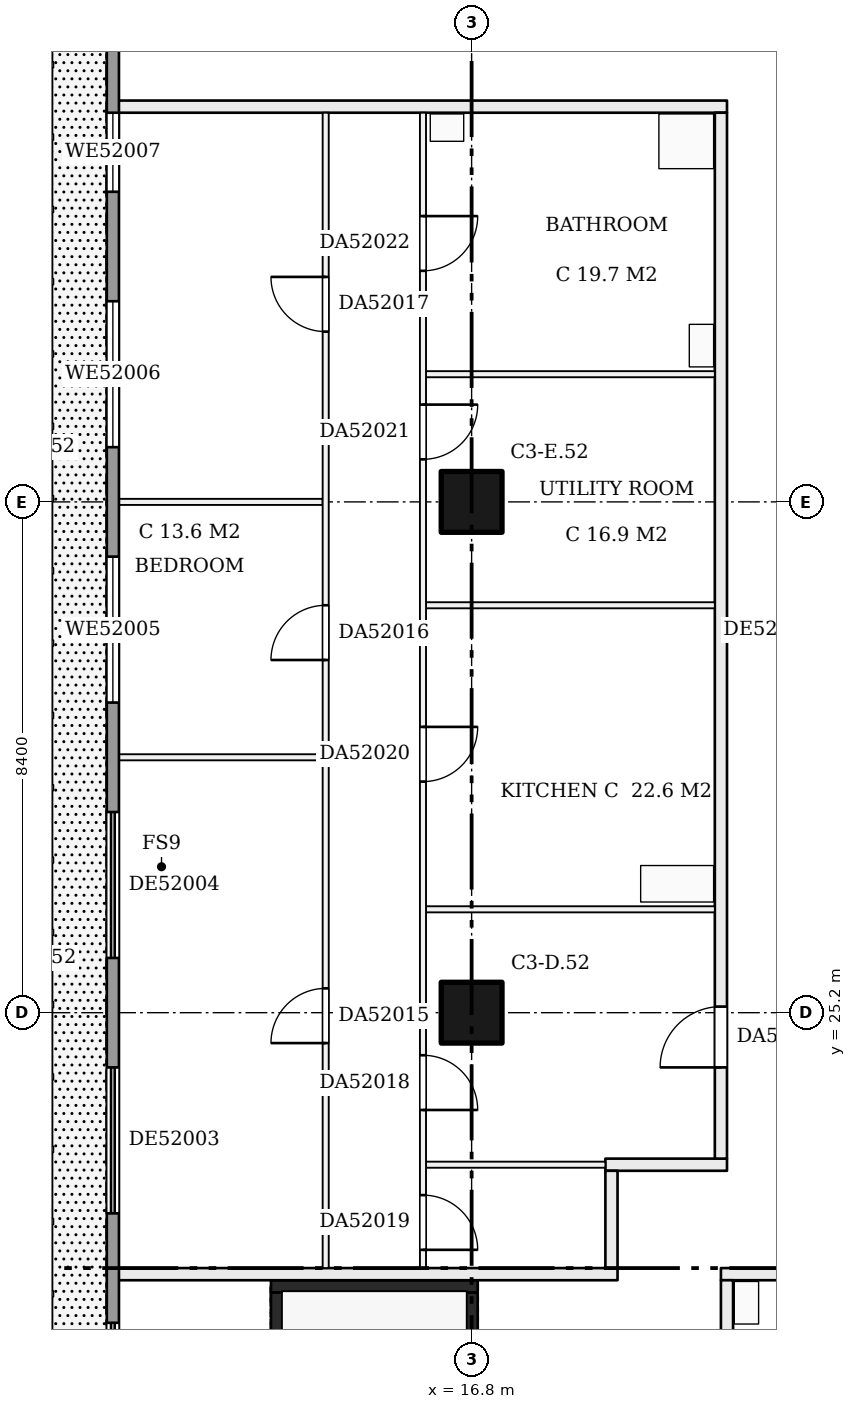
"""IFC4 building model, lengths in metres.
Left out: names, types, materials, properties, quantities, classifications, styles, units other than length and angle.
Written with IfcOpenShell. Run it as: python <this file> out.ifc"""

import sys

from ifc_helpers import new_model, si_unit, direction, frame, frame_2d, origin, origin_2d, place, context, subcontext, project, spatial, rectangle, extrude, element, fill, save


model = new_model("IFC4")
c1 = context("Model", 3, precision=1e-05, world=origin(), true_north=direction((0.0, 1.0)))
c2 = subcontext(c1, "Body", "Model", "MODEL_VIEW")
j1 = project(units=[si_unit("LENGTHUNIT", "METRE"), si_unit("PLANEANGLEUNIT", "RADIAN")], contexts=[c1])
p1 = place(None, origin())
s1 = spatial("IfcSite", under=j1, at=p1, CompositionType="ELEMENT")
p2 = place(p1, origin())
s2 = spatial("IfcBuilding", under=s1, at=p2, CompositionType="ELEMENT")
p3 = place(p2, frame((0.0, 0.0, 200.2)))
s3 = spatial("IfcBuildingStorey", under=s2, at=p3, CompositionType="ELEMENT", Elevation=200.2)
for number, where, z_axis, x_axis in (
    (1, (16.8, 25.2, 0.0), (0.0, 0.0, 1.0), (1.0, 0.0, 0.0)),
    (2, (16.8, 33.6, 0.0), (0.0, 0.0, 1.0), (1.0, 0.0, 0.0)),
):
    element("IfcColumn", number, at=place(p3, frame(where, z_axis=z_axis, x_axis=x_axis)), inside=s3, PredefinedType="COLUMN", context=c2, shape_type="SweptSolid", body=[
        extrude(rectangle(XDim=1.0, YDim=1.0, at=origin_2d()), origin(), (0.0, 0.0, 1.0), 3.22),
    ])
p4 = place(p3, frame((13.6, 13.8, 0.0), z_axis=(0.0, 0.0, 1.0), x_axis=(0.0, 1.0, 0.0)))
e3 = element("IfcWall", 3, at=p4, inside=s3, PredefinedType="SHEAR", context=c2, shape_type="SweptSolid", body=[
    extrude(rectangle(XDim=6.8, YDim=0.2, at=frame_2d((3.4, 0.0))), origin(), (0.0, 0.0, 1.0), 3.22),
])
p5 = place(p3, frame((16.8, 13.8, 0.0), z_axis=(0.0, 0.0, 1.0), x_axis=(0.0, 1.0, 0.0)))
e4 = element("IfcWall", 4, at=p5, inside=s3, PredefinedType="SHEAR", context=c2, shape_type="SweptSolid", body=[
    extrude(rectangle(XDim=6.8, YDim=0.2, at=frame_2d((3.4, 0.0))), origin(), (0.0, 0.0, 1.0), 3.22),
])
p6 = place(p5, frame((0.1, 0.0, 0.0)))
e5 = element("IfcOpeningElement", 5, at=p6, cuts=e4, PredefinedType="OPENING", context=c2, shape_type="SweptSolid", body=[
    extrude(rectangle(XDim=1.0, YDim=2.1, at=frame_2d((0.5, 1.05))), frame((0.0, 0.11, 0.0), z_axis=(0.0, -1.0, 0.0), x_axis=(1.0, 0.0, 0.0)), (0.0, 0.0, 1.0), 0.22),
])
p7 = place(p3, frame((13.5, 20.7, 0.0), z_axis=(0.0, 0.0, 1.0), x_axis=(1.0, 0.0, 0.0)))
e6 = element("IfcWall", 6, at=p7, inside=s3, PredefinedType="SHEAR", context=c2, shape_type="SweptSolid", body=[
    extrude(rectangle(XDim=3.4, YDim=0.2, at=frame_2d((1.7, 0.0))), origin(), (0.0, 0.0, 1.0), 3.22),
])
p8 = place(p3, frame((10.9, 20.9, 0.0), z_axis=(0.0, 0.0, 1.0), x_axis=(1.0, 0.0, 0.0)))
e7 = element("IfcWall", 7, at=p8, inside=s3, PredefinedType="PARTITIONING", context=c2, shape_type="SweptSolid", body=[
    extrude(rectangle(XDim=8.3, YDim=0.2, at=frame_2d((4.15, 0.0))), origin(), (0.0, 0.0, 1.0), 3.22),
])
p9 = place(p3, frame((20.9, 20.9, 0.0), z_axis=(0.0, 0.0, 1.0), x_axis=(1.0, 0.0, 0.0)))
e8 = element("IfcWall", 8, at=p9, inside=s3, PredefinedType="PARTITIONING", context=c2, shape_type="SweptSolid", body=[
    extrude(rectangle(XDim=19.3, YDim=0.2, at=frame_2d((9.65, 0.0))), origin(), (0.0, 0.0, 1.0), 3.22),
])
p10 = place(p9, frame((5.374, 0.0, 0.0)))
e9 = element("IfcOpeningElement", 9, at=p10, cuts=e8, PredefinedType="OPENING", context=c2, shape_type="SweptSolid", body=[
    extrude(rectangle(XDim=1.0, YDim=2.1, at=frame_2d((0.5, 1.05))), frame((0.0, 0.11, 0.0), z_axis=(0.0, -1.0, 0.0), x_axis=(1.0, 0.0, 0.0)), (0.0, 0.0, 1.0), 0.22),
])
p11 = place(p9, frame((13.633, 0.0, 0.0)))
e10 = element("IfcOpeningElement", 10, at=p11, cuts=e8, PredefinedType="OPENING", context=c2, shape_type="SweptSolid", body=[
    extrude(rectangle(XDim=1.0, YDim=2.1, at=frame_2d((0.5, 1.05))), frame((0.0, 0.11, 0.0), z_axis=(0.0, -1.0, 0.0), x_axis=(1.0, 0.0, 0.0)), (0.0, 0.0, 1.0), 0.22),
])
p12 = place(p3, frame((16.05, 22.7, 0.0), z_axis=(0.0, 0.0, 1.0), x_axis=(1.0, 0.0, 0.0)))
e11 = element("IfcWall", 11, at=p12, inside=s3, PredefinedType="PARTITIONING", context=c2, shape_type="SweptSolid", body=[
    extrude(rectangle(XDim=2.95, YDim=0.1, at=frame_2d((1.475, 0.0))), origin(), (0.0, 0.0, 1.0), 3.22),
])
p13 = place(p3, frame((19.0, 22.7, 0.0), z_axis=(0.0, 0.0, 1.0), x_axis=(1.0, 0.0, 0.0)))
e12 = element("IfcWall", 12, at=p13, inside=s3, PredefinedType="PARTITIONING", context=c2, shape_type="SweptSolid", body=[
    extrude(rectangle(XDim=2.0, YDim=0.2, at=frame_2d((1.0, 0.0))), origin(), (0.0, 0.0, 1.0), 3.22),
])
p14 = place(p3, frame((16.05, 26.9, 0.0), z_axis=(0.0, 0.0, 1.0), x_axis=(1.0, 0.0, 0.0)))
e13 = element("IfcWall", 13, at=p14, inside=s3, PredefinedType="PARTITIONING", context=c2, shape_type="SweptSolid", body=[
    extrude(rectangle(XDim=4.75, YDim=0.1, at=frame_2d((2.375, 0.0))), origin(), (0.0, 0.0, 1.0), 3.22),
])
p15 = place(p3, frame((10.9, 29.4, 0.0), z_axis=(0.0, 0.0, 1.0), x_axis=(1.0, 0.0, 0.0)))
e14 = element("IfcWall", 14, at=p15, inside=s3, PredefinedType="PARTITIONING", context=c2, shape_type="SweptSolid", body=[
    extrude(rectangle(XDim=3.45, YDim=0.1, at=frame_2d((1.725, 0.0))), origin(), (0.0, 0.0, 1.0), 3.22),
])
p16 = place(p3, frame((16.05, 31.9, 0.0), z_axis=(0.0, 0.0, 1.0), x_axis=(1.0, 0.0, 0.0)))
e15 = element("IfcWall", 15, at=p16, inside=s3, PredefinedType="PARTITIONING", context=c2, shape_type="SweptSolid", body=[
    extrude(rectangle(XDim=4.75, YDim=0.1, at=frame_2d((2.375, 0.0))), origin(), (0.0, 0.0, 1.0), 3.22),
])
p17 = place(p3, frame((10.9, 33.6, 0.0), z_axis=(0.0, 0.0, 1.0), x_axis=(1.0, 0.0, 0.0)))
e16 = element("IfcWall", 16, at=p17, inside=s3, PredefinedType="PARTITIONING", context=c2, shape_type="SweptSolid", body=[
    extrude(rectangle(XDim=3.45, YDim=0.1, at=frame_2d((1.725, 0.0))), origin(), (0.0, 0.0, 1.0), 3.22),
])
p18 = place(p3, frame((16.05, 35.7, 0.0), z_axis=(0.0, 0.0, 1.0), x_axis=(1.0, 0.0, 0.0)))
e17 = element("IfcWall", 17, at=p18, inside=s3, PredefinedType="PARTITIONING", context=c2, shape_type="SweptSolid", body=[
    extrude(rectangle(XDim=4.75, YDim=0.1, at=frame_2d((2.375, 0.0))), origin(), (0.0, 0.0, 1.0), 3.22),
])
p19 = place(p3, frame((10.9, 40.1, 0.0), z_axis=(0.0, 0.0, 1.0), x_axis=(1.0, 0.0, 0.0)))
e18 = element("IfcWall", 18, at=p19, inside=s3, PredefinedType="PARTITIONING", context=c2, shape_type="SweptSolid", body=[
    extrude(rectangle(XDim=10.1, YDim=0.2, at=frame_2d((5.05, 0.0))), origin(), (0.0, 0.0, 1.0), 3.22),
])
p20 = place(p3, frame((14.4, 21.0, 0.0), z_axis=(0.0, 0.0, 1.0), x_axis=(0.0, 1.0, 0.0)))
e19 = element("IfcWall", 19, at=p20, inside=s3, PredefinedType="PARTITIONING", context=c2, shape_type="SweptSolid", body=[
    extrude(rectangle(XDim=19.0, YDim=0.1, at=frame_2d((9.5, 0.0))), origin(), (0.0, 0.0, 1.0), 3.22),
])
p21 = place(p20, frame((3.7, 0.0, 0.0)))
e20 = element("IfcOpeningElement", 20, at=p21, cuts=e19, PredefinedType="OPENING", context=c2, shape_type="SweptSolid", body=[
    extrude(rectangle(XDim=0.9, YDim=2.1, at=frame_2d((0.45, 1.05))), frame((0.0, 0.06, 0.0), z_axis=(0.0, -1.0, 0.0), x_axis=(1.0, 0.0, 0.0)), (0.0, 0.0, 1.0), 0.12),
])
p22 = place(p20, frame((10.0, 0.0, 0.0)))
e21 = element("IfcOpeningElement", 21, at=p22, cuts=e19, PredefinedType="OPENING", context=c2, shape_type="SweptSolid", body=[
    extrude(rectangle(XDim=0.9, YDim=2.1, at=frame_2d((0.45, 1.05))), frame((0.0, 0.06, 0.0), z_axis=(0.0, -1.0, 0.0), x_axis=(1.0, 0.0, 0.0)), (0.0, 0.0, 1.0), 0.12),
])
p23 = place(p20, frame((15.4, 0.0, 0.0)))
e22 = element("IfcOpeningElement", 22, at=p23, cuts=e19, PredefinedType="OPENING", context=c2, shape_type="SweptSolid", body=[
    extrude(rectangle(XDim=0.9, YDim=2.1, at=frame_2d((0.45, 1.05))), frame((0.0, 0.06, 0.0), z_axis=(0.0, -1.0, 0.0), x_axis=(1.0, 0.0, 0.0)), (0.0, 0.0, 1.0), 0.12),
])
p24 = place(p3, frame((16.0, 21.0, 0.0), z_axis=(0.0, 0.0, 1.0), x_axis=(0.0, 1.0, 0.0)))
e23 = element("IfcWall", 23, at=p24, inside=s3, PredefinedType="PARTITIONING", context=c2, shape_type="SweptSolid", body=[
    extrude(rectangle(XDim=19.0, YDim=0.1, at=frame_2d((9.5, 0.0))), origin(), (0.0, 0.0, 1.0), 3.22),
])
p25 = place(p24, frame((2.6, 0.0, 0.0)))
e24 = element("IfcOpeningElement", 24, at=p25, cuts=e23, PredefinedType="OPENING", context=c2, shape_type="SweptSolid", body=[
    extrude(rectangle(XDim=0.9, YDim=2.1, at=frame_2d((0.45, 1.05))), frame((0.0, 0.06, 0.0), z_axis=(0.0, -1.0, 0.0), x_axis=(1.0, 0.0, 0.0)), (0.0, 0.0, 1.0), 0.12),
])
p26 = place(p24, frame((0.3, 0.0, 0.0)))
e25 = element("IfcOpeningElement", 25, at=p26, cuts=e23, PredefinedType="OPENING", context=c2, shape_type="SweptSolid", body=[
    extrude(rectangle(XDim=0.9, YDim=2.1, at=frame_2d((0.45, 1.05))), frame((0.0, 0.06, 0.0), z_axis=(0.0, -1.0, 0.0), x_axis=(1.0, 0.0, 0.0)), (0.0, 0.0, 1.0), 0.12),
])
p27 = place(p24, frame((8.0, 0.0, 0.0)))
e26 = element("IfcOpeningElement", 26, at=p27, cuts=e23, PredefinedType="OPENING", context=c2, shape_type="SweptSolid", body=[
    extrude(rectangle(XDim=0.9, YDim=2.1, at=frame_2d((0.45, 1.05))), frame((0.0, 0.06, 0.0), z_axis=(0.0, -1.0, 0.0), x_axis=(1.0, 0.0, 0.0)), (0.0, 0.0, 1.0), 0.12),
])
p28 = place(p24, frame((13.3, 0.0, 0.0)))
e27 = element("IfcOpeningElement", 27, at=p28, cuts=e23, PredefinedType="OPENING", context=c2, shape_type="SweptSolid", body=[
    extrude(rectangle(XDim=0.9, YDim=2.1, at=frame_2d((0.45, 1.05))), frame((0.0, 0.06, 0.0), z_axis=(0.0, -1.0, 0.0), x_axis=(1.0, 0.0, 0.0)), (0.0, 0.0, 1.0), 0.12),
])
p29 = place(p24, frame((16.4, 0.0, 0.0)))
e28 = element("IfcOpeningElement", 28, at=p29, cuts=e23, PredefinedType="OPENING", context=c2, shape_type="SweptSolid", body=[
    extrude(rectangle(XDim=0.9, YDim=2.1, at=frame_2d((0.45, 1.05))), frame((0.0, 0.06, 0.0), z_axis=(0.0, -1.0, 0.0), x_axis=(1.0, 0.0, 0.0)), (0.0, 0.0, 1.0), 0.12),
])
p30 = place(p3, frame((19.1, 21.0, 0.0), z_axis=(0.0, 0.0, 1.0), x_axis=(0.0, 1.0, 0.0)))
e29 = element("IfcWall", 29, at=p30, inside=s3, PredefinedType="PARTITIONING", context=c2, shape_type="SweptSolid", body=[
    extrude(rectangle(XDim=1.6, YDim=0.2, at=frame_2d((0.8, 0.0))), origin(), (0.0, 0.0, 1.0), 3.22),
])
p31 = place(p3, frame((20.9, 22.8, 0.0), z_axis=(0.0, 0.0, 1.0), x_axis=(0.0, 1.0, 0.0)))
e30 = element("IfcWall", 30, at=p31, inside=s3, PredefinedType="PARTITIONING", context=c2, shape_type="SweptSolid", body=[
    extrude(rectangle(XDim=17.2, YDim=0.2, at=frame_2d((8.6, 0.0))), origin(), (0.0, 0.0, 1.0), 3.22),
])
p32 = place(p31, frame((1.5, 0.0, 0.0)))
e31 = element("IfcOpeningElement", 31, at=p32, cuts=e30, PredefinedType="OPENING", context=c2, shape_type="SweptSolid", body=[
    extrude(rectangle(XDim=1.0, YDim=2.1, at=frame_2d((0.5, 1.05))), frame((0.0, 0.11, 0.0), z_axis=(0.0, -1.0, 0.0), x_axis=(1.0, 0.0, 0.0)), (0.0, 0.0, 1.0), 0.22),
])
p33 = place(p3, frame((21.0, 13.7, 0.0), z_axis=(0.0, 0.0, 1.0), x_axis=(0.0, 1.0, 0.0)))
e32 = element("IfcWall", 32, at=p33, inside=s3, PredefinedType="PARTITIONING", context=c2, shape_type="SweptSolid", body=[
    extrude(rectangle(XDim=7.1, YDim=0.2, at=frame_2d((3.55, 0.0))), origin(), (0.0, 0.0, 1.0), 3.22),
])
p34 = place(p3, frame((10.9, 42.0, 0.0), z_axis=(0.0, 0.0, 1.0), x_axis=(0.0, -1.0, 0.0)))
e33 = element("IfcWall", 33, at=p34, inside=s3, PredefinedType="SOLIDWALL", context=c2, shape_type="SweptSolid", body=[
    extrude(rectangle(XDim=28.6, YDim=0.2, at=frame_2d((14.3, 0.0))), origin(), (0.0, 0.0, 1.0), 3.22),
])
p35 = place(p34, frame((25.9, 0.0, 0.0)))
e34 = element("IfcOpeningElement", 34, at=p35, cuts=e33, PredefinedType="OPENING", context=c2, shape_type="SweptSolid", body=[
    extrude(rectangle(XDim=2.4, YDim=2.2, at=frame_2d((1.2, 1.1))), frame((0.0, 0.11, 0.0), z_axis=(0.0, -1.0, 0.0), x_axis=(1.0, 0.0, 0.0)), (0.0, 0.0, 1.0), 0.22),
])
p36 = place(p34, frame((21.9, 0.0, 0.0)))
e35 = element("IfcOpeningElement", 35, at=p36, cuts=e33, PredefinedType="OPENING", context=c2, shape_type="SweptSolid", body=[
    extrude(rectangle(XDim=2.4, YDim=2.2, at=frame_2d((1.2, 1.1))), frame((0.0, 0.11, 0.0), z_axis=(0.0, -1.0, 0.0), x_axis=(1.0, 0.0, 0.0)), (0.0, 0.0, 1.0), 0.22),
])
p37 = place(p34, frame((17.7, 0.0, 0.0)))
e36 = element("IfcOpeningElement", 36, at=p37, cuts=e33, PredefinedType="OPENING", context=c2, shape_type="SweptSolid", body=[
    extrude(rectangle(XDim=2.4, YDim=2.2, at=frame_2d((1.2, 1.1))), frame((0.0, 0.11, 0.0), z_axis=(0.0, -1.0, 0.0), x_axis=(1.0, 0.0, 0.0)), (0.0, 0.0, 1.0), 0.22),
])
p38 = place(p34, frame((13.5, 0.0, 0.0)))
e37 = element("IfcOpeningElement", 37, at=p38, cuts=e33, PredefinedType="OPENING", context=c2, shape_type="SweptSolid", body=[
    extrude(rectangle(XDim=2.4, YDim=2.2, at=frame_2d((1.2, 1.1))), frame((0.0, 0.11, 0.0), z_axis=(0.0, -1.0, 0.0), x_axis=(1.0, 0.0, 0.0)), (0.0, 0.0, 1.0), 0.22),
])
p39 = place(p34, frame((9.3, 0.0, 0.9)))
e38 = element("IfcOpeningElement", 38, at=p39, cuts=e33, PredefinedType="OPENING", context=c2, shape_type="SweptSolid", body=[
    extrude(rectangle(XDim=2.4, YDim=1.5, at=frame_2d((1.2, 0.75))), frame((0.0, 0.11, 0.0), z_axis=(0.0, -1.0, 0.0), x_axis=(1.0, 0.0, 0.0)), (0.0, 0.0, 1.0), 0.22),
])
p40 = place(p34, frame((5.1, 0.0, 0.9)))
e39 = element("IfcOpeningElement", 39, at=p40, cuts=e33, PredefinedType="OPENING", context=c2, shape_type="SweptSolid", body=[
    extrude(rectangle(XDim=2.4, YDim=1.5, at=frame_2d((1.2, 0.75))), frame((0.0, 0.11, 0.0), z_axis=(0.0, -1.0, 0.0), x_axis=(1.0, 0.0, 0.0)), (0.0, 0.0, 1.0), 0.22),
])
p41 = place(p34, frame((2.0, 0.0, 0.9)))
e40 = element("IfcOpeningElement", 40, at=p41, cuts=e33, PredefinedType="OPENING", context=c2, shape_type="SweptSolid", body=[
    extrude(rectangle(XDim=1.3, YDim=1.5, at=frame_2d((0.65, 0.75))), frame((0.0, 0.11, 0.0), z_axis=(0.0, -1.0, 0.0), x_axis=(1.0, 0.0, 0.0)), (0.0, 0.0, 1.0), 0.22),
])
p42 = place(p21, origin())
e41 = element("IfcDoor", 41, at=p42, inside=s3, OperationType="SINGLE_SWING_LEFT", PredefinedType="DOOR", context=c2, shape_type="SweptSolid", body=[
    extrude(rectangle(XDim=0.9, YDim=2.1, at=frame_2d((0.45, 1.05))), frame((0.0, 0.025, 0.0), z_axis=(0.0, -1.0, 0.0), x_axis=(1.0, 0.0, 0.0)), (0.0, 0.0, 1.0), 0.05),
])
fill(e20, e41)
p43 = place(p22, origin())
e42 = element("IfcDoor", 42, at=p43, inside=s3, OperationType="SINGLE_SWING_LEFT", PredefinedType="DOOR", context=c2, shape_type="SweptSolid", body=[
    extrude(rectangle(XDim=0.9, YDim=2.1, at=frame_2d((0.45, 1.05))), frame((0.0, 0.025, 0.0), z_axis=(0.0, -1.0, 0.0), x_axis=(1.0, 0.0, 0.0)), (0.0, 0.0, 1.0), 0.05),
])
fill(e21, e42)
p44 = place(p23, origin())
e43 = element("IfcDoor", 43, at=p44, inside=s3, OperationType="SINGLE_SWING_RIGHT", PredefinedType="DOOR", context=c2, shape_type="SweptSolid", body=[
    extrude(rectangle(XDim=0.9, YDim=2.1, at=frame_2d((0.45, 1.05))), frame((0.0, 0.025, 0.0), z_axis=(0.0, -1.0, 0.0), x_axis=(1.0, 0.0, 0.0)), (0.0, 0.0, 1.0), 0.05),
])
fill(e22, e43)
p45 = place(p25, frame((0.9, 0.0, 0.0), z_axis=(0.0, 0.0, 1.0), x_axis=(-1.0, 0.0, 0.0)))
e44 = element("IfcDoor", 44, at=p45, inside=s3, OperationType="SINGLE_SWING_RIGHT", PredefinedType="DOOR", context=c2, shape_type="SweptSolid", body=[
    extrude(rectangle(XDim=0.9, YDim=2.1, at=frame_2d((0.45, 1.05))), frame((0.0, 0.025, 0.0), z_axis=(0.0, -1.0, 0.0), x_axis=(1.0, 0.0, 0.0)), (0.0, 0.0, 1.0), 0.05),
])
fill(e24, e44)
p46 = place(p26, frame((0.9, 0.0, 0.0), z_axis=(0.0, 0.0, 1.0), x_axis=(-1.0, 0.0, 0.0)))
e45 = element("IfcDoor", 45, at=p46, inside=s3, OperationType="SINGLE_SWING_RIGHT", PredefinedType="DOOR", context=c2, shape_type="SweptSolid", body=[
    extrude(rectangle(XDim=0.9, YDim=2.1, at=frame_2d((0.45, 1.05))), frame((0.0, 0.025, 0.0), z_axis=(0.0, -1.0, 0.0), x_axis=(1.0, 0.0, 0.0)), (0.0, 0.0, 1.0), 0.05),
])
fill(e25, e45)
p47 = place(p27, frame((0.9, 0.0, 0.0), z_axis=(0.0, 0.0, 1.0), x_axis=(-1.0, 0.0, 0.0)))
e46 = element("IfcDoor", 46, at=p47, inside=s3, OperationType="SINGLE_SWING_LEFT", PredefinedType="DOOR", context=c2, shape_type="SweptSolid", body=[
    extrude(rectangle(XDim=0.9, YDim=2.1, at=frame_2d((0.45, 1.05))), frame((0.0, 0.025, 0.0), z_axis=(0.0, -1.0, 0.0), x_axis=(1.0, 0.0, 0.0)), (0.0, 0.0, 1.0), 0.05),
])
fill(e26, e46)
p48 = place(p28, frame((0.9, 0.0, 0.0), z_axis=(0.0, 0.0, 1.0), x_axis=(-1.0, 0.0, 0.0)))
e47 = element("IfcDoor", 47, at=p48, inside=s3, OperationType="SINGLE_SWING_LEFT", PredefinedType="DOOR", context=c2, shape_type="SweptSolid", body=[
    extrude(rectangle(XDim=0.9, YDim=2.1, at=frame_2d((0.45, 1.05))), frame((0.0, 0.025, 0.0), z_axis=(0.0, -1.0, 0.0), x_axis=(1.0, 0.0, 0.0)), (0.0, 0.0, 1.0), 0.05),
])
fill(e27, e47)
p49 = place(p29, frame((0.9, 0.0, 0.0), z_axis=(0.0, 0.0, 1.0), x_axis=(-1.0, 0.0, 0.0)))
e48 = element("IfcDoor", 48, at=p49, inside=s3, OperationType="SINGLE_SWING_LEFT", PredefinedType="DOOR", context=c2, shape_type="SweptSolid", body=[
    extrude(rectangle(XDim=0.9, YDim=2.1, at=frame_2d((0.45, 1.05))), frame((0.0, 0.025, 0.0), z_axis=(0.0, -1.0, 0.0), x_axis=(1.0, 0.0, 0.0)), (0.0, 0.0, 1.0), 0.05),
])
fill(e28, e48)
p50 = place(p32, origin())
e49 = element("IfcDoor", 49, at=p50, inside=s3, OperationType="SINGLE_SWING_LEFT", PredefinedType="DOOR", context=c2, shape_type="SweptSolid", body=[
    extrude(rectangle(XDim=1.0, YDim=2.1, at=frame_2d((0.5, 1.05))), frame((0.0, 0.025, 0.0), z_axis=(0.0, -1.0, 0.0), x_axis=(1.0, 0.0, 0.0)), (0.0, 0.0, 1.0), 0.05),
])
fill(e31, e49)
p51 = place(p36, origin())
e50 = element("IfcDoor", 50, at=p51, inside=s3, OperationType="DOUBLE_DOOR_SLIDING", PredefinedType="DOOR", context=c2, shape_type="SweptSolid", body=[
    extrude(rectangle(XDim=2.4, YDim=2.2, at=frame_2d((1.2, 1.1))), frame((0.0, 0.025, 0.0), z_axis=(0.0, -1.0, 0.0), x_axis=(1.0, 0.0, 0.0)), (0.0, 0.0, 1.0), 0.05),
])
fill(e35, e50)
p52 = place(p37, origin())
e51 = element("IfcDoor", 51, at=p52, inside=s3, OperationType="DOUBLE_DOOR_SLIDING", PredefinedType="DOOR", context=c2, shape_type="SweptSolid", body=[
    extrude(rectangle(XDim=2.4, YDim=2.2, at=frame_2d((1.2, 1.1))), frame((0.0, 0.025, 0.0), z_axis=(0.0, -1.0, 0.0), x_axis=(1.0, 0.0, 0.0)), (0.0, 0.0, 1.0), 0.05),
])
fill(e36, e51)
p53 = place(p38, origin())
e52 = element("IfcDoor", 52, at=p53, inside=s3, OperationType="DOUBLE_DOOR_SLIDING", PredefinedType="DOOR", context=c2, shape_type="SweptSolid", body=[
    extrude(rectangle(XDim=2.4, YDim=2.2, at=frame_2d((1.2, 1.1))), frame((0.0, 0.025, 0.0), z_axis=(0.0, -1.0, 0.0), x_axis=(1.0, 0.0, 0.0)), (0.0, 0.0, 1.0), 0.05),
])
fill(e37, e52)
p54 = place(p39, origin())
e53 = element("IfcWindow", 53, at=p54, inside=s3, PartitioningType="SINGLE_PANEL", PredefinedType="WINDOW", context=c2, shape_type="SweptSolid", body=[
    extrude(rectangle(XDim=2.4, YDim=1.5, at=frame_2d((1.2, 0.75))), frame((0.0, 0.03, 0.0), z_axis=(0.0, -1.0, 0.0), x_axis=(1.0, 0.0, 0.0)), (0.0, 0.0, 1.0), 0.06),
])
fill(e38, e53)
p55 = place(p40, origin())
e54 = element("IfcWindow", 54, at=p55, inside=s3, PartitioningType="SINGLE_PANEL", PredefinedType="WINDOW", context=c2, shape_type="SweptSolid", body=[
    extrude(rectangle(XDim=2.4, YDim=1.5, at=frame_2d((1.2, 0.75))), frame((0.0, 0.03, 0.0), z_axis=(0.0, -1.0, 0.0), x_axis=(1.0, 0.0, 0.0)), (0.0, 0.0, 1.0), 0.06),
])
fill(e39, e54)
p56 = place(p41, origin())
e55 = element("IfcWindow", 55, at=p56, inside=s3, PartitioningType="SINGLE_PANEL", PredefinedType="WINDOW", context=c2, shape_type="SweptSolid", body=[
    extrude(rectangle(XDim=1.3, YDim=1.5, at=frame_2d((0.65, 0.75))), frame((0.0, 0.03, 0.0), z_axis=(0.0, -1.0, 0.0), x_axis=(1.0, 0.0, 0.0)), (0.0, 0.0, 1.0), 0.06),
])
fill(e40, e55)
save(model, sys.argv[1])
